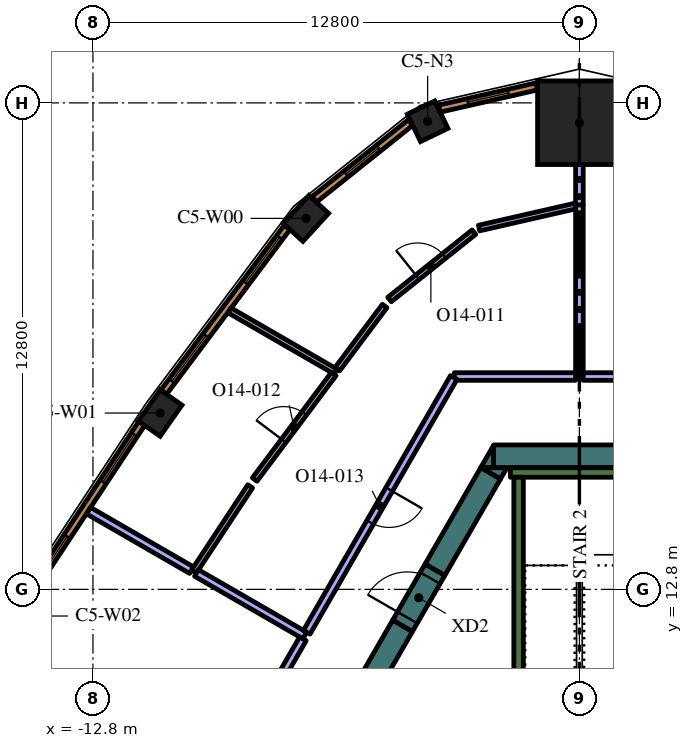
"""IFC4 building model, lengths in metres.
Left out: names, types, materials, properties, quantities, classifications, styles, units other than length and angle.
Written with IfcOpenShell. Run it as: python <this file> out.ifc"""

import sys

from ifc_helpers import new_model, si_unit, direction, frame, frame_2d, origin, origin_2d, place, context, subcontext, project, spatial, polyline, rectangle, outline, extrude, element, fill, save


model = new_model("IFC4")
c1 = context("Model", 3, precision=1e-05, world=origin(), true_north=direction((0.0, 1.0)))
c2 = subcontext(c1, "Body", "Model", "MODEL_VIEW")
j1 = project(units=[si_unit("LENGTHUNIT", "METRE"), si_unit("PLANEANGLEUNIT", "RADIAN")], contexts=[c1])
p1 = place(None, origin())
s1 = spatial("IfcSite", under=j1, at=p1, CompositionType="ELEMENT")
p2 = place(p1, origin())
s2 = spatial("IfcBuilding", under=s1, at=p2, CompositionType="ELEMENT")
p3 = place(p2, frame((0.0, 0.0, 309.0)))
s3 = spatial("IfcBuildingStorey", under=s2, at=p3, CompositionType="ELEMENT", Elevation=309.0)
p4 = place(p3, frame((0.0, 25.078, 0.0), z_axis=(0.0, 0.0, 1.0), x_axis=(0.0, 1.0, 0.0)))
e1 = element("IfcColumn", 1, at=p4, inside=s3, PredefinedType="COLUMN", context=c2, shape_type="SweptSolid", body=[
    extrude(rectangle(XDim=2.2, YDim=2.2, at=origin_2d()), origin(), (0.0, 0.0, 1.0), 4.2),
])
p5 = place(p3, frame((-3.993, 25.116, 0.0), z_axis=(0.0, 0.0, 1.0), x_axis=(-0.900873321869, -0.434082086644, 0.0)))
e2 = element("IfcColumn", 2, at=p5, inside=s3, PredefinedType="COLUMN", context=c2, shape_type="SweptSolid", body=[
    extrude(rectangle(XDim=0.8, YDim=0.8, at=origin_2d()), origin(), (0.0, 0.0, 1.0), 4.2),
])
for number, where, z_axis, x_axis in (
    (3, (-7.195, 22.561, 0.0), (0.0, 0.0, 1.0), (-0.676, -0.737, 0.0)),
    (4, (-11.032, 17.44, 0.0), (0.0, 0.0, 1.0), (-0.575, -0.818, 0.0)),
):
    element("IfcColumn", number, at=place(p3, frame(where, z_axis=z_axis, x_axis=x_axis)), inside=s3, PredefinedType="COLUMN", context=c2, shape_type="SweptSolid", body=[
        extrude(rectangle(XDim=1.0, YDim=0.7, at=origin_2d()), origin(), (0.0, 0.0, 1.0), 4.2),
    ])
p6 = place(p3, frame((-2.258, 16.3, 0.0), z_axis=(0.0, 0.0, 1.0), x_axis=(1.0, 0.0, 0.0)))
e5 = element("IfcWall", 5, at=p6, inside=s3, PredefinedType="SOLIDWALL", context=c2, shape_type="SweptSolid", body=[
    extrude(rectangle(XDim=3.823, YDim=0.6, at=frame_2d((1.912, 0.0))), origin(), (0.0, 0.0, 1.0), 4.2),
])
p7 = place(p3, origin())
e6 = element("IfcWall", 6, at=p7, inside=s3, PredefinedType="SOLIDWALL", context=c2, shape_type="SweptSolid", body=[
    extrude(outline(polyline([(-2.598, 16.0), (-2.26, 16.585), (-2.26, 16.0), (-2.598, 16.0)])), origin(), (0.0, 0.0, 1.0), 4.2),
])
p8 = place(p3, frame((-2.335, 15.855, 0.0), z_axis=(0.0, 0.0, 1.0), x_axis=(-0.499960127962, -0.866048422692, 0.0)))
e7 = element("IfcWall", 7, at=p8, inside=s3, PredefinedType="SOLIDWALL", context=c2, shape_type="SweptSolid", body=[
    extrude(rectangle(XDim=2.934, YDim=0.6, at=frame_2d((1.467, 0.0))), origin(), (0.0, 0.0, 1.0), 4.2),
])
e8 = element("IfcWall", 8, at=p7, inside=s3, PredefinedType="SOLIDWALL", context=c2, shape_type="SweptSolid", body=[
    extrude(outline(polyline([(-1.905, 16.0), (-2.074, 15.707), (-2.581, 16.0), (-1.905, 16.0)])), origin(), (0.0, 0.0, 1.0), 4.2),
])
p9 = place(p3, frame((-12.582, -1.892, 0.0), z_axis=(0.0, 0.0, 1.0), x_axis=(0.500003640647, 0.866023301845, 0.0)))
e9 = element("IfcWall", 9, at=p9, inside=s3, PredefinedType="SOLIDWALL", context=c2, shape_type="SweptSolid", body=[
    extrude(rectangle(XDim=15.858, YDim=0.6, at=frame_2d((7.929, 0.0))), origin(), (0.0, 0.0, 1.0), 4.2),
])
p10 = place(p3, frame((-1.817, 15.875, 0.0), z_axis=(0.0, 0.0, 1.0), x_axis=(1.0, 0.0, 0.0)))
e10 = element("IfcWall", 10, at=p10, inside=s3, PredefinedType="SOLIDWALL", context=c2, shape_type="SweptSolid", body=[
    extrude(rectangle(XDim=3.634, YDim=0.25, at=frame_2d((1.817, 0.0))), origin(), (0.0, 0.0, 1.0), 4.2),
])
p11 = place(p3, frame((-1.6, 8.7, 0.0), z_axis=(0.0, 0.0, 1.0), x_axis=(0.0, 1.0, 0.0)))
e11 = element("IfcWall", 11, at=p11, inside=s3, PredefinedType="SOLIDWALL", context=c2, shape_type="SweptSolid", body=[
    extrude(rectangle(XDim=7.05, YDim=0.25, at=frame_2d((3.525, 0.0))), origin(), (0.0, 0.0, 1.0), 4.2),
])
p12 = place(p3, frame((-4.652, 11.842, 0.0), z_axis=(0.0, 0.0, 1.0), x_axis=(0.500062241894, 0.865989465428, 0.0)))
e12 = element("IfcWall", 12, at=p12, inside=s3, PredefinedType="SOLIDWALL", context=c2, shape_type="SweptSolid", body=[
    extrude(rectangle(XDim=1.7, YDim=0.6, at=frame_2d((0.85, 0.0))), origin(), (0.0, 0.0, 1.0), 4.2),
])
p13 = place(p12, frame((0.25, 0.0, 0.0)))
e13 = element("IfcOpeningElement", 13, at=p13, cuts=e12, PredefinedType="OPENING", context=c2, shape_type="SweptSolid", body=[
    extrude(rectangle(XDim=1.2, YDim=2.1, at=frame_2d((0.6, 1.05))), frame((0.0, 0.31, 0.0), z_axis=(0.0, -1.0, 0.0), x_axis=(1.0, 0.0, 0.0)), (0.0, 0.0, 1.0), 0.62),
])
p14 = place(p3, frame((0.0, 22.906, 0.0), z_axis=(0.0, 0.0, 1.0), x_axis=(0.0, 1.0, 0.0)))
e14 = element("IfcWall", 14, at=p14, inside=s3, PredefinedType="PARTITIONING", context=c2, shape_type="SweptSolid", body=[
    extrude(rectangle(XDim=1.072, YDim=0.2, at=frame_2d((0.536, 0.0))), origin(), (0.0, 0.0, 1.0), 3.55),
])
p15 = place(p3, frame((0.0, 18.4, 0.0), z_axis=(0.0, 0.0, 1.0), x_axis=(0.0, 1.0, 0.0)))
e15 = element("IfcWall", 15, at=p15, inside=s3, PredefinedType="PARTITIONING", context=c2, shape_type="SweptSolid", body=[
    extrude(rectangle(XDim=4.514, YDim=0.2, at=frame_2d((2.257, 0.0))), origin(), (0.0, 0.0, 1.0), 3.55),
])
p16 = place(p3, frame((3.261, 18.4, 0.0), z_axis=(0.0, 0.0, 1.0), x_axis=(-1.0, 0.0, 0.0)))
e16 = element("IfcWall", 16, at=p16, inside=s3, PredefinedType="PARTITIONING", context=c2, shape_type="SweptSolid", body=[
    extrude(rectangle(XDim=3.161, YDim=0.2, at=frame_2d((1.581, 0.0))), origin(), (0.0, 0.0, 1.0), 3.55),
])
p17 = place(p3, frame((-6.417, 18.53, 0.0), z_axis=(0.0, 0.0, 1.0), x_axis=(-0.866034203951, 0.499984757355, 0.0)))
e17 = element("IfcWall", 17, at=p17, inside=s3, PredefinedType="PARTITIONING", context=c2, shape_type="SweptSolid", body=[
    extrude(rectangle(XDim=3.223, YDim=0.15, at=frame_2d((1.611, 0.0))), origin(), (0.0, 0.0, 1.0), 3.55),
])
p18 = place(p3, frame((-0.1, 22.887, 0.0), z_axis=(0.0, 0.0, 1.0), x_axis=(-0.974895716418, -0.222661945805, 0.0)))
e18 = element("IfcWall", 18, at=p18, inside=s3, PredefinedType="PARTITIONING", context=c2, shape_type="SweptSolid", body=[
    extrude(rectangle(XDim=2.605, YDim=0.15, at=frame_2d((1.303, 0.0))), origin(), (0.0, 0.0, 1.0), 3.55),
])
p19 = place(p3, frame((-4.995, 20.427, 0.0), z_axis=(0.0, 0.0, 1.0), x_axis=(0.781622833459, 0.62375134967, 0.0)))
e19 = element("IfcWall", 19, at=p19, inside=s3, PredefinedType="PARTITIONING", context=c2, shape_type="SweptSolid", body=[
    extrude(rectangle(XDim=2.841, YDim=0.15, at=frame_2d((1.42, 0.0))), origin(), (0.0, 0.0, 1.0), 3.55),
])
p20 = place(p19, frame((0.941, 0.0, 0.0)))
e20 = element("IfcOpeningElement", 20, at=p20, cuts=e19, PredefinedType="OPENING", context=c2, shape_type="SweptSolid", body=[
    extrude(rectangle(XDim=0.9, YDim=2.1, at=frame_2d((0.45, 1.05))), frame((0.0, 0.085, 0.0), z_axis=(0.0, -1.0, 0.0), x_axis=(1.0, 0.0, 0.0)), (0.0, 0.0, 1.0), 0.17),
])
p21 = place(p3, frame((-5.124, 20.256, 0.0), z_axis=(0.0, 0.0, 1.0), x_axis=(-0.599549274705, -0.800337845663, 0.0)))
e21 = element("IfcWall", 21, at=p21, inside=s3, PredefinedType="PARTITIONING", context=c2, shape_type="SweptSolid", body=[
    extrude(rectangle(XDim=2.08, YDim=0.15, at=frame_2d((1.04, 0.0))), origin(), (0.0, 0.0, 1.0), 3.55),
])
p22 = place(p3, frame((-8.544, 15.69, 0.0), z_axis=(0.0, 0.0, 1.0), x_axis=(0.599538824769, 0.800345673815, 0.0)))
e22 = element("IfcWall", 22, at=p22, inside=s3, PredefinedType="PARTITIONING", context=c2, shape_type="SweptSolid", body=[
    extrude(rectangle(XDim=3.474, YDim=0.15, at=frame_2d((1.737, 0.0))), origin(), (0.0, 0.0, 1.0), 3.55),
])
p23 = place(p22, frame((1.274, 0.0, 0.0)))
e23 = element("IfcOpeningElement", 23, at=p23, cuts=e22, PredefinedType="OPENING", context=c2, shape_type="SweptSolid", body=[
    extrude(rectangle(XDim=0.9, YDim=2.1, at=frame_2d((0.45, 1.05))), frame((0.0, 0.085, 0.0), z_axis=(0.0, -1.0, 0.0), x_axis=(1.0, 0.0, 0.0)), (0.0, 0.0, 1.0), 0.17),
])
p24 = place(p3, frame((-8.662, 15.511, 0.0), z_axis=(0.0, 0.0, 1.0), x_axis=(-0.550792824442, -0.834641997831, 0.0)))
e24 = element("IfcWall", 24, at=p24, inside=s3, PredefinedType="PARTITIONING", context=c2, shape_type="SweptSolid", body=[
    extrude(rectangle(XDim=2.686, YDim=0.15, at=frame_2d((1.343, 0.0))), origin(), (0.0, 0.0, 1.0), 3.55),
])
p25 = place(p3, frame((-10.207, 13.306, 0.0), z_axis=(0.0, 0.0, 1.0), x_axis=(-0.866041434906, 0.499972232254, 0.0)))
e25 = element("IfcWall", 25, at=p25, inside=s3, PredefinedType="PARTITIONING", context=c2, shape_type="SweptSolid", body=[
    extrude(rectangle(XDim=3.131, YDim=0.2, at=frame_2d((1.565, 0.0))), origin(), (0.0, 0.0, 1.0), 3.55),
])
p26 = place(p3, frame((-7.226, 11.585, 0.0), z_axis=(0.0, 0.0, 1.0), x_axis=(-0.866034923029, 0.499983511822, 0.0)))
e26 = element("IfcWall", 26, at=p26, inside=s3, PredefinedType="PARTITIONING", context=c2, shape_type="SweptSolid", body=[
    extrude(rectangle(XDim=3.292, YDim=0.2, at=frame_2d((1.646, 0.0))), origin(), (0.0, 0.0, 1.0), 3.55),
])
p27 = place(p3, frame((-0.1, 18.4, 0.0), z_axis=(0.0, 0.0, 1.0), x_axis=(-1.0, 0.0, 0.0)))
e27 = element("IfcWall", 27, at=p27, inside=s3, PredefinedType="PARTITIONING", context=c2, shape_type="SweptSolid", body=[
    extrude(rectangle(XDim=3.191, YDim=0.2, at=frame_2d((1.595, 0.0))), origin(), (0.0, 0.0, 1.0), 3.55),
])
p28 = place(p3, frame((-3.306, 18.374, 0.0), z_axis=(0.0, 0.0, 1.0), x_axis=(-0.500000072396, -0.866025361987, 0.0)))
e28 = element("IfcWall", 28, at=p28, inside=s3, PredefinedType="PARTITIONING", context=c2, shape_type="SweptSolid", body=[
    extrude(rectangle(XDim=7.739, YDim=0.2, at=frame_2d((3.87, 0.0))), origin(), (0.0, 0.0, 1.0), 3.55),
])
p29 = place(p28, frame((3.4, 0.0, 0.0)))
e29 = element("IfcOpeningElement", 29, at=p29, cuts=e28, PredefinedType="OPENING", context=c2, shape_type="SweptSolid", body=[
    extrude(rectangle(XDim=1.0, YDim=2.1, at=frame_2d((0.5, 1.05))), frame((0.0, 0.11, 0.0), z_axis=(0.0, -1.0, 0.0), x_axis=(1.0, 0.0, 0.0)), (0.0, 0.0, 1.0), 0.22),
])
p30 = place(p3, frame((-7.275, 11.499, 0.0), z_axis=(0.0, 0.0, 1.0), x_axis=(-0.500025407441, -0.866010734295, 0.0)))
e30 = element("IfcWall", 30, at=p30, inside=s3, PredefinedType="PARTITIONING", context=c2, shape_type="SweptSolid", body=[
    extrude(rectangle(XDim=1.791, YDim=0.2, at=frame_2d((0.895, 0.0))), origin(), (0.0, 0.0, 1.0), 3.55),
])
p31 = place(p3, frame((-1.122, 26.033, 0.0), z_axis=(0.0, 0.0, 1.0), x_axis=(-0.974913273386, -0.222585060988, 0.0)))
e31 = element("IfcWall", 31, at=p31, inside=s3, PredefinedType="SOLIDWALL", context=c2, shape_type="SweptSolid", body=[
    extrude(rectangle(XDim=2.627, YDim=0.19, at=frame_2d((1.313, 0.0))), origin(), (0.0, 0.0, 1.0), 3.95),
])
p32 = place(p31, frame((0.763, 0.0, 0.6)))
e32 = element("IfcOpeningElement", 32, at=p32, cuts=e31, PredefinedType="OPENING", context=c2, shape_type="SweptSolid", body=[
    extrude(rectangle(XDim=1.1, YDim=2.85, at=frame_2d((0.55, 1.425))), frame((0.0, 0.105, 0.0), z_axis=(0.0, -1.0, 0.0), x_axis=(1.0, 0.0, 0.0)), (0.0, 0.0, 1.0), 0.21),
])
p33 = place(p3, frame((-4.448, 25.08, 0.0), z_axis=(0.0, 0.0, 1.0), x_axis=(-0.781626234064, -0.623747088349, 0.0)))
e33 = element("IfcWall", 33, at=p33, inside=s3, PredefinedType="SOLIDWALL", context=c2, shape_type="SweptSolid", body=[
    extrude(rectangle(XDim=3.237, YDim=0.19, at=frame_2d((1.618, 0.0))), origin(), (0.0, 0.0, 1.0), 3.95),
])
p34 = place(p33, frame((1.068, 0.0, 0.6)))
e34 = element("IfcOpeningElement", 34, at=p34, cuts=e33, PredefinedType="OPENING", context=c2, shape_type="SweptSolid", body=[
    extrude(rectangle(XDim=1.1, YDim=2.85, at=frame_2d((0.55, 1.425))), frame((0.0, 0.105, 0.0), z_axis=(0.0, -1.0, 0.0), x_axis=(1.0, 0.0, 0.0)), (0.0, 0.0, 1.0), 0.21),
])
p35 = place(p3, frame((-7.692, 22.324, 0.0), z_axis=(0.0, 0.0, 1.0), x_axis=(-0.599559865294, -0.800329911929, 0.0)))
e35 = element("IfcWall", 35, at=p35, inside=s3, PredefinedType="SOLIDWALL", context=c2, shape_type="SweptSolid", body=[
    extrude(rectangle(XDim=5.415, YDim=0.19, at=frame_2d((2.708, 0.0))), origin(), (0.0, 0.0, 1.0), 3.95),
])
p36 = place(p35, frame((0.323, 0.0, 0.6)))
e36 = element("IfcOpeningElement", 36, at=p36, cuts=e35, PredefinedType="OPENING", context=c2, shape_type="SweptSolid", body=[
    extrude(rectangle(XDim=1.5, YDim=2.85, at=frame_2d((0.75, 1.425))), frame((0.0, 0.105, 0.0), z_axis=(0.0, -1.0, 0.0), x_axis=(1.0, 0.0, 0.0)), (0.0, 0.0, 1.0), 0.21),
])
p37 = place(p35, frame((3.558, 0.0, 0.6)))
e37 = element("IfcOpeningElement", 37, at=p37, cuts=e35, PredefinedType="OPENING", context=c2, shape_type="SweptSolid", body=[
    extrude(rectangle(XDim=1.5, YDim=2.85, at=frame_2d((0.75, 1.425))), frame((0.0, 0.105, 0.0), z_axis=(0.0, -1.0, 0.0), x_axis=(1.0, 0.0, 0.0)), (0.0, 0.0, 1.0), 0.21),
])
p38 = place(p3, frame((-11.518, 17.166, 0.0), z_axis=(0.0, 0.0, 1.0), x_axis=(-0.550744054781, -0.83467417962, 0.0)))
e38 = element("IfcWall", 38, at=p38, inside=s3, PredefinedType="SOLIDWALL", context=c2, shape_type="SweptSolid", body=[
    extrude(rectangle(XDim=5.406, YDim=0.19, at=frame_2d((2.703, 0.0))), origin(), (0.0, 0.0, 1.0), 3.95),
])
p39 = place(p38, frame((0.346, 0.0, 0.6)))
e39 = element("IfcOpeningElement", 39, at=p39, cuts=e38, PredefinedType="OPENING", context=c2, shape_type="SweptSolid", body=[
    extrude(rectangle(XDim=1.5, YDim=2.85, at=frame_2d((0.75, 1.425))), frame((0.0, 0.105, 0.0), z_axis=(0.0, -1.0, 0.0), x_axis=(1.0, 0.0, 0.0)), (0.0, 0.0, 1.0), 0.21),
])
p40 = place(p38, frame((3.559, 0.0, 0.6)))
e40 = element("IfcOpeningElement", 40, at=p40, cuts=e38, PredefinedType="OPENING", context=c2, shape_type="SweptSolid", body=[
    extrude(rectangle(XDim=1.5, YDim=2.85, at=frame_2d((0.75, 1.425))), frame((0.0, 0.105, 0.0), z_axis=(0.0, -1.0, 0.0), x_axis=(1.0, 0.0, 0.0)), (0.0, 0.0, 1.0), 0.21),
])
p41 = place(p13, origin())
e41 = element("IfcDoor", 41, at=p41, inside=s3, OperationType="SINGLE_SWING_LEFT", PredefinedType="DOOR", context=c2, shape_type="SweptSolid", body=[
    extrude(rectangle(XDim=1.2, YDim=2.1, at=frame_2d((0.6, 1.05))), frame((0.0, 0.025, 0.0), z_axis=(0.0, -1.0, 0.0), x_axis=(1.0, 0.0, 0.0)), (0.0, 0.0, 1.0), 0.05),
])
fill(e13, e41)
p42 = place(p20, origin())
e42 = element("IfcDoor", 42, at=p42, inside=s3, OperationType="SINGLE_SWING_LEFT", PredefinedType="DOOR", context=c2, shape_type="SweptSolid", body=[
    extrude(rectangle(XDim=0.9, YDim=2.1, at=frame_2d((0.45, 1.05))), frame((0.0, 0.025, 0.0), z_axis=(0.0, -1.0, 0.0), x_axis=(1.0, 0.0, 0.0)), (0.0, 0.0, 1.0), 0.05),
])
fill(e20, e42)
p43 = place(p23, origin())
e43 = element("IfcDoor", 43, at=p43, inside=s3, OperationType="SINGLE_SWING_LEFT", PredefinedType="DOOR", context=c2, shape_type="SweptSolid", body=[
    extrude(rectangle(XDim=0.9, YDim=2.1, at=frame_2d((0.45, 1.05))), frame((0.0, 0.025, 0.0), z_axis=(0.0, -1.0, 0.0), x_axis=(1.0, 0.0, 0.0)), (0.0, 0.0, 1.0), 0.05),
])
fill(e23, e43)
p44 = place(p29, origin())
e44 = element("IfcDoor", 44, at=p44, inside=s3, OperationType="SINGLE_SWING_RIGHT", PredefinedType="DOOR", context=c2, shape_type="SweptSolid", body=[
    extrude(rectangle(XDim=1.0, YDim=2.1, at=frame_2d((0.5, 1.05))), frame((0.0, 0.025, 0.0), z_axis=(0.0, -1.0, 0.0), x_axis=(1.0, 0.0, 0.0)), (0.0, 0.0, 1.0), 0.05),
])
fill(e29, e44)
p45 = place(p32, origin())
e45 = element("IfcWindow", 45, at=p45, inside=s3, PartitioningType="SINGLE_PANEL", PredefinedType="WINDOW", context=c2, shape_type="SweptSolid", body=[
    extrude(rectangle(XDim=1.1, YDim=2.85, at=frame_2d((0.55, 1.425))), frame((0.0, 0.045, 0.0), z_axis=(0.0, -1.0, 0.0), x_axis=(1.0, 0.0, 0.0)), (0.0, 0.0, 1.0), 0.06),
])
fill(e32, e45)
p46 = place(p34, origin())
e46 = element("IfcWindow", 46, at=p46, inside=s3, PartitioningType="SINGLE_PANEL", PredefinedType="WINDOW", context=c2, shape_type="SweptSolid", body=[
    extrude(rectangle(XDim=1.1, YDim=2.85, at=frame_2d((0.55, 1.425))), frame((0.0, 0.045, 0.0), z_axis=(0.0, -1.0, 0.0), x_axis=(1.0, 0.0, 0.0)), (0.0, 0.0, 1.0), 0.06),
])
fill(e34, e46)
p47 = place(p36, origin())
e47 = element("IfcWindow", 47, at=p47, inside=s3, PartitioningType="SINGLE_PANEL", PredefinedType="WINDOW", context=c2, shape_type="SweptSolid", body=[
    extrude(rectangle(XDim=1.5, YDim=2.85, at=frame_2d((0.75, 1.425))), frame((0.0, 0.045, 0.0), z_axis=(0.0, -1.0, 0.0), x_axis=(1.0, 0.0, 0.0)), (0.0, 0.0, 1.0), 0.06),
])
fill(e36, e47)
p48 = place(p37, origin())
e48 = element("IfcWindow", 48, at=p48, inside=s3, PartitioningType="SINGLE_PANEL", PredefinedType="WINDOW", context=c2, shape_type="SweptSolid", body=[
    extrude(rectangle(XDim=1.5, YDim=2.85, at=frame_2d((0.75, 1.425))), frame((0.0, 0.045, 0.0), z_axis=(0.0, -1.0, 0.0), x_axis=(1.0, 0.0, 0.0)), (0.0, 0.0, 1.0), 0.06),
])
fill(e37, e48)
p49 = place(p39, origin())
e49 = element("IfcWindow", 49, at=p49, inside=s3, PartitioningType="SINGLE_PANEL", PredefinedType="WINDOW", context=c2, shape_type="SweptSolid", body=[
    extrude(rectangle(XDim=1.5, YDim=2.85, at=frame_2d((0.75, 1.425))), frame((0.0, 0.045, 0.0), z_axis=(0.0, -1.0, 0.0), x_axis=(1.0, 0.0, 0.0)), (0.0, 0.0, 1.0), 0.06),
])
fill(e39, e49)
p50 = place(p40, origin())
e50 = element("IfcWindow", 50, at=p50, inside=s3, PartitioningType="SINGLE_PANEL", PredefinedType="WINDOW", context=c2, shape_type="SweptSolid", body=[
    extrude(rectangle(XDim=1.5, YDim=2.85, at=frame_2d((0.75, 1.425))), frame((0.0, 0.045, 0.0), z_axis=(0.0, -1.0, 0.0), x_axis=(1.0, 0.0, 0.0)), (0.0, 0.0, 1.0), 0.06),
])
fill(e40, e50)
save(model, sys.argv[1])
